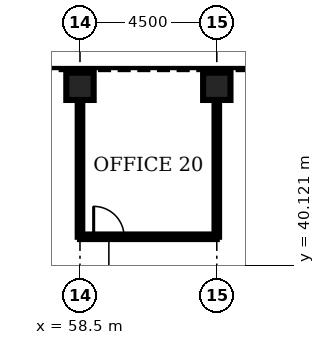
"""IFC4 building model, lengths in metres.
Left out: names, types, materials, properties, quantities, classifications, styles, units other than length and angle.
Written with IfcOpenShell. Run it as: python <this file> out.ifc"""

import sys

from ifc_helpers import new_model, si_unit, direction, frame, frame_2d, origin, origin_2d, place, context, subcontext, project, spatial, rectangle, hollow_rectangle, extrude, element, fill, save


model = new_model("IFC4")
c1 = context("Model", 3, precision=1e-05, world=origin(), true_north=direction((0.0, 1.0)))
c2 = subcontext(c1, "Body", "Model", "MODEL_VIEW")
j1 = project(units=[si_unit("LENGTHUNIT", "METRE"), si_unit("PLANEANGLEUNIT", "RADIAN")], contexts=[c1])
p1 = place(None, origin())
s1 = spatial("IfcSite", under=j1, at=p1, CompositionType="ELEMENT")
p2 = place(p1, origin())
s2 = spatial("IfcBuilding", under=s1, at=p2, CompositionType="ELEMENT")
p3 = place(p2, frame((0.0, 0.0, 142.5)))
s3 = spatial("IfcBuildingStorey", under=s2, at=p3, CompositionType="ELEMENT", Elevation=142.5)
for number, where, z_axis, x_axis in (
    (1, (63.0, 46.0, 0.0), (0.0, 0.0, 1.0), (0.0, 1.0, 0.0)),
    (2, (58.5, 46.0, 0.0), (0.0, 0.0, 1.0), (0.0, 1.0, 0.0)),
):
    element("IfcColumn", number, at=place(p3, frame(where, z_axis=z_axis, x_axis=x_axis)), inside=s3, PredefinedType="COLUMN", context=c2, shape_type="SweptSolid", body=[
        extrude(hollow_rectangle(XDim=0.9, YDim=0.9, WallThickness=0.1, at=origin_2d()), origin(), (0.0, 0.0, 1.0), 4.2),
    ])
p4 = place(p3, frame((58.5, 41.05, 0.0), z_axis=(0.0, 0.0, 1.0), x_axis=(1.0, 0.0, 0.0)))
e3 = element("IfcWall", 3, at=p4, inside=s3, PredefinedType="PARTITIONING", context=c2, shape_type="SweptSolid", body=[
    extrude(rectangle(XDim=4.5, YDim=0.15, at=frame_2d((2.25, 0.0))), origin(), (0.0, 0.0, 1.0), 3.0),
])
p5 = place(p4, frame((0.45, 0.0, 0.0)))
e4 = element("IfcOpeningElement", 4, at=p5, cuts=e3, PredefinedType="OPENING", context=c2, shape_type="SweptSolid", body=[
    extrude(rectangle(XDim=1.0, YDim=2.1, at=frame_2d((0.5, 1.05))), frame((0.0, 0.085, 0.0), z_axis=(0.0, -1.0, 0.0), x_axis=(1.0, 0.0, 0.0)), (0.0, 0.0, 1.0), 0.17),
])
for number, where, z_axis, x_axis in (
    (5, (58.5, 41.05, 0.0), (0.0, 0.0, 1.0), (0.0, 1.0, 0.0)),
    (6, (63.0, 41.05, 0.0), (0.0, 0.0, 1.0), (0.0, 1.0, 0.0)),
):
    element("IfcWall", number, at=place(p3, frame(where, z_axis=z_axis, x_axis=x_axis)), inside=s3, PredefinedType="PARTITIONING", context=c2, shape_type="SweptSolid", body=[
        extrude(rectangle(XDim=4.5, YDim=0.15, at=frame_2d((2.25, 0.0))), origin(), (0.0, 0.0, 1.0), 3.0),
    ])
p6 = place(p5, origin())
e7 = element("IfcDoor", 7, at=p6, inside=s3, OperationType="SINGLE_SWING_LEFT", PredefinedType="DOOR", context=c2, shape_type="SweptSolid", body=[
    extrude(rectangle(XDim=1.0, YDim=2.1, at=frame_2d((0.5, 1.05))), frame((0.0, 0.025, 0.0), z_axis=(0.0, -1.0, 0.0), x_axis=(1.0, 0.0, 0.0)), (0.0, 0.0, 1.0), 0.05),
])
fill(e4, e7)
save(model, sys.argv[1])
